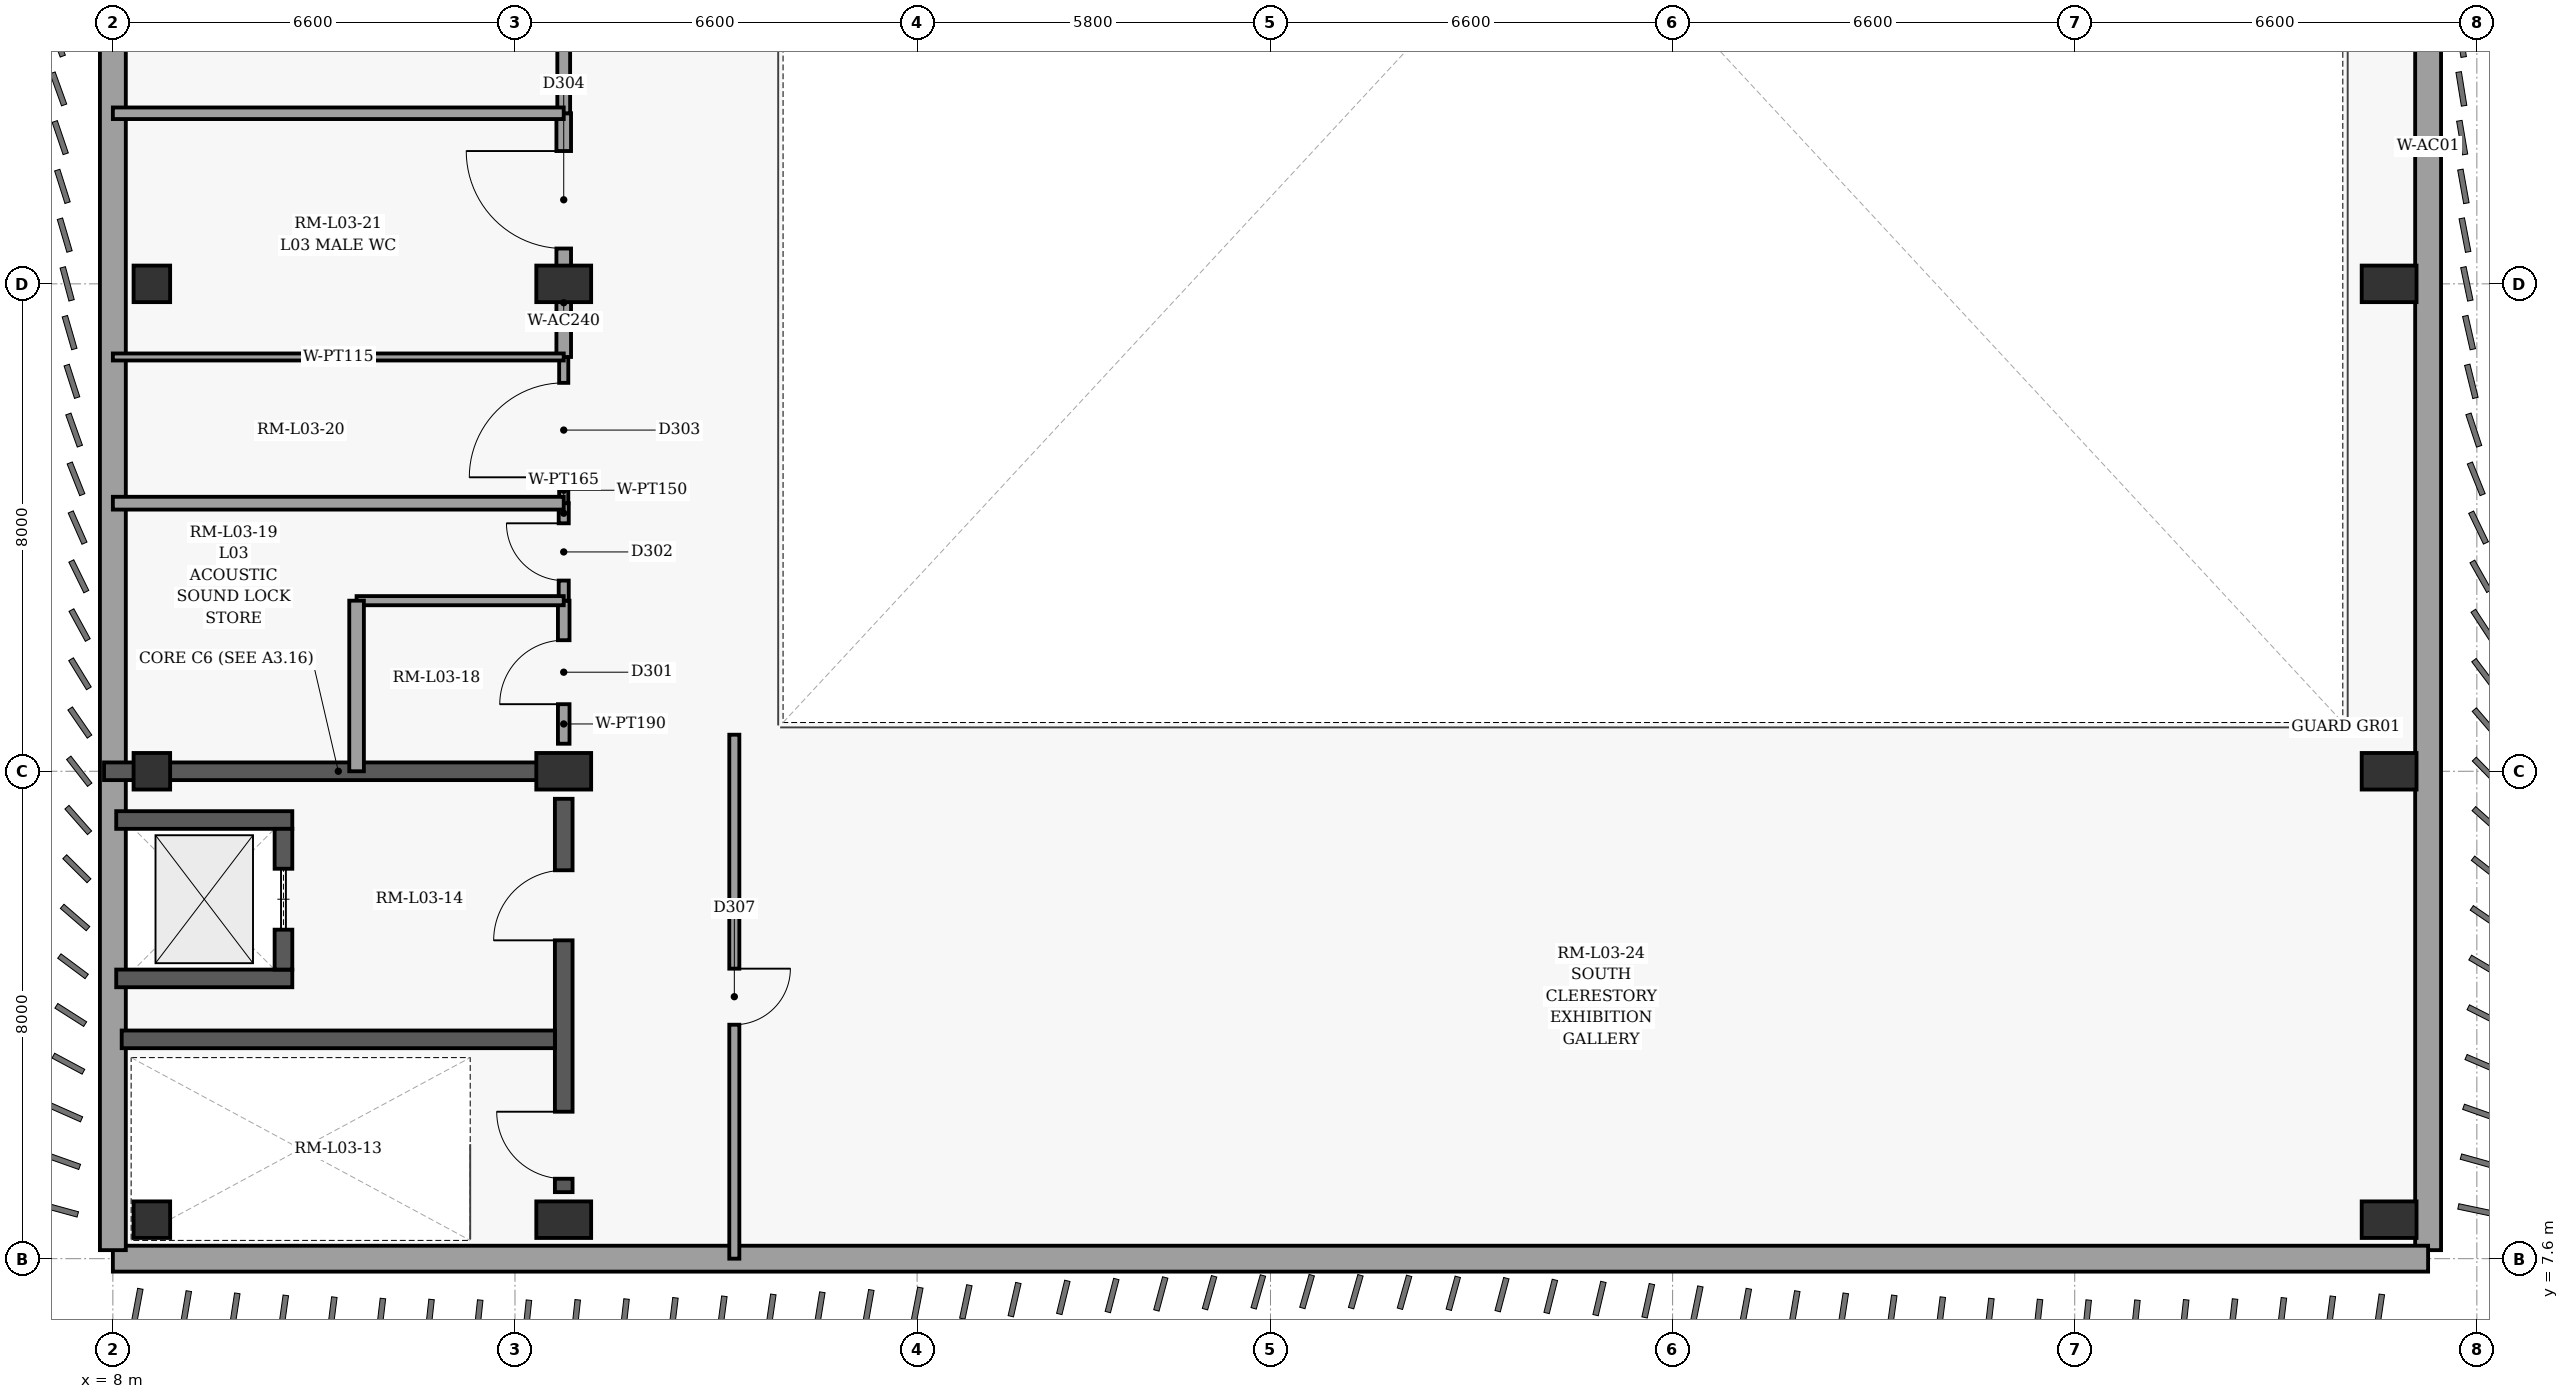
"""IFC4 building model, lengths in metres.
Left out: names, types, materials, properties, quantities, classifications, styles, units other than length and angle.
Written with IfcOpenShell. Run it as: python <this file> out.ifc"""

import sys

from ifc_helpers import new_model, si_unit, direction, frame, frame_2d, origin, origin_2d, place, context, subcontext, project, spatial, rectangle, extrude, element, fill, save


model = new_model("IFC4")
c1 = context("Model", 3, precision=1e-05, world=origin(), true_north=direction((0.0, 1.0)))
c2 = subcontext(c1, "Body", "Model", "MODEL_VIEW")
j1 = project(units=[si_unit("LENGTHUNIT", "METRE"), si_unit("PLANEANGLEUNIT", "RADIAN")], contexts=[c1])
p1 = place(None, origin())
s1 = spatial("IfcSite", under=j1, at=p1, CompositionType="ELEMENT")
p2 = place(p1, origin())
s2 = spatial("IfcBuilding", under=s1, at=p2, CompositionType="ELEMENT")
p3 = place(p2, frame((0.0, 0.0, 15.6)))
s3 = spatial("IfcBuildingStorey", under=s2, at=p3, CompositionType="ELEMENT", Elevation=15.6)
for number, where, z_axis, x_axis in (
    (1, (8.64, 8.24, 0.0), (0.0, 0.0, 1.0), (1.0, 0.0, 0.0)),
    (2, (8.64, 15.6, 0.0), (0.0, 0.0, 1.0), (1.0, 0.0, 0.0)),
    (3, (8.64, 23.6, 0.0), (0.0, 0.0, 1.0), (1.0, 0.0, 0.0)),
):
    element("IfcColumn", number, at=place(p3, frame(where, z_axis=z_axis, x_axis=x_axis)), inside=s3, PredefinedType="COLUMN", context=c2, shape_type="SweptSolid", body=[
        extrude(rectangle(XDim=0.6, YDim=0.6, at=origin_2d()), origin(), (0.0, 0.0, 1.0), 4.8),
    ])
for number, where, z_axis, x_axis in (
    (4, (15.4, 8.24, 0.0), (0.0, 0.0, 1.0), (1.0, 0.0, 0.0)),
    (5, (15.4, 15.6, 0.0), (0.0, 0.0, 1.0), (1.0, 0.0, 0.0)),
    (6, (15.4, 23.6, 0.0), (0.0, 0.0, 1.0), (1.0, 0.0, 0.0)),
    (7, (45.36, 8.24, 0.0), (0.0, 0.0, 1.0), (1.0, 0.0, 0.0)),
    (8, (45.36, 15.6, 0.0), (0.0, 0.0, 1.0), (1.0, 0.0, 0.0)),
    (9, (45.36, 23.6, 0.0), (0.0, 0.0, 1.0), (1.0, 0.0, 0.0)),
):
    element("IfcColumn", number, at=place(p3, frame(where, z_axis=z_axis, x_axis=x_axis)), inside=s3, PredefinedType="COLUMN", context=c2, shape_type="SweptSolid", body=[
        extrude(rectangle(XDim=0.6, YDim=0.9, at=origin_2d()), origin(), (0.0, 0.0, 1.0), 4.8),
    ])
p4 = place(p3, frame((46.0, 63.46, 0.0), z_axis=(0.0, 0.0, 1.0), x_axis=(0.0, -1.0, 0.0)))
e10 = element("IfcWall", 10, at=p4, inside=s3, PredefinedType="SOLIDWALL", context=c2, shape_type="SweptSolid", body=[
    extrude(rectangle(XDim=55.72, YDim=0.425, at=frame_2d((27.86, 0.0))), origin(), (0.0, 0.0, 1.0), 4.555),
])
p5 = place(p3, frame((46.0, 7.6, 0.0), z_axis=(0.0, 0.0, 1.0), x_axis=(-1.0, 0.0, 0.0)))
e11 = element("IfcWall", 11, at=p5, inside=s3, PredefinedType="SOLIDWALL", context=c2, shape_type="SweptSolid", body=[
    extrude(rectangle(XDim=38.0, YDim=0.425, at=frame_2d((19.0, 0.0))), origin(), (0.0, 0.0, 1.0), 4.162),
])
p6 = place(p3, frame((8.0, 7.74, 0.0), z_axis=(0.0, 0.0, 1.0), x_axis=(0.0, 1.0, 0.0)))
e12 = element("IfcWall", 12, at=p6, inside=s3, PredefinedType="SOLIDWALL", context=c2, shape_type="SweptSolid", body=[
    extrude(rectangle(XDim=55.72, YDim=0.425, at=frame_2d((27.86, 0.0))), origin(), (0.0, 0.0, 1.0), 4.555),
])
p7 = place(p3, frame((7.855, 15.6, 0.0), z_axis=(0.0, 0.0, 1.0), x_axis=(1.0, 0.0, 0.0)))
e13 = element("IfcWall", 13, at=p7, inside=s3, PredefinedType="SHEAR", context=c2, shape_type="SweptSolid", body=[
    extrude(rectangle(XDim=7.243, YDim=0.29, at=frame_2d((3.622, 0.0))), origin(), (0.0, 0.0, 1.0), 4.555),
])
p8 = place(p3, frame((15.4, 8.692, 0.0), z_axis=(0.0, 0.0, 1.0), x_axis=(0.0, 1.0, 0.0)))
e14 = element("IfcWall", 14, at=p8, inside=s3, PredefinedType="SHEAR", context=c2, shape_type="SweptSolid", body=[
    extrude(rectangle(XDim=6.456, YDim=0.29, at=frame_2d((3.228, 0.0))), origin(), (0.0, 0.0, 1.0), 4.555),
])
p9 = place(p8, frame((0.22, 0.0, 0.0)))
e15 = element("IfcOpeningElement", 15, at=p9, cuts=e14, PredefinedType="OPENING", context=c2, shape_type="SweptSolid", body=[
    extrude(rectangle(XDim=1.1, YDim=2.15, at=frame_2d((0.55, 1.075))), frame((0.0, 0.155, 0.0), z_axis=(0.0, -1.0, 0.0), x_axis=(1.0, 0.0, 0.0)), (0.0, 0.0, 1.0), 0.31),
])
p10 = place(p8, frame((4.133, 0.0, 0.0)))
e16 = element("IfcOpeningElement", 16, at=p10, cuts=e14, PredefinedType="OPENING", context=c2, shape_type="SweptSolid", body=[
    extrude(rectangle(XDim=1.15, YDim=2.2, at=frame_2d((0.575, 1.1))), frame((0.0, 0.155, 0.0), z_axis=(0.0, -1.0, 0.0), x_axis=(1.0, 0.0, 0.0)), (0.0, 0.0, 1.0), 0.31),
])
p11 = place(p3, frame((8.145, 11.2, 0.0), z_axis=(0.0, 0.0, 1.0), x_axis=(1.0, 0.0, 0.0)))
e17 = element("IfcWall", 17, at=p11, inside=s3, PredefinedType="SHEAR", context=c2, shape_type="SweptSolid", body=[
    extrude(rectangle(XDim=7.11, YDim=0.29, at=frame_2d((3.555, 0.0))), origin(), (0.0, 0.0, 1.0), 4.555),
])
for number, where, z_axis, x_axis in (
    (18, (8.055, 12.2, 0.0), (0.0, 0.0, 1.0), (1.0, 0.0, 0.0)),
    (19, (8.055, 14.8, 0.0), (0.0, 0.0, 1.0), (1.0, 0.0, 0.0)),
):
    element("IfcWall", number, at=place(p3, frame(where, z_axis=z_axis, x_axis=x_axis)), inside=s3, PredefinedType="SHEAR", context=c2, shape_type="SweptSolid", body=[
        extrude(rectangle(XDim=2.89, YDim=0.29, at=frame_2d((1.445, 0.0))), origin(), (0.0, 0.0, 1.0), 4.555),
    ])
p12 = place(p3, frame((10.8, 12.345, 0.0), z_axis=(0.0, 0.0, 1.0), x_axis=(0.0, 1.0, 0.0)))
e20 = element("IfcWall", 20, at=p12, inside=s3, PredefinedType="SHEAR", context=c2, shape_type="SweptSolid", body=[
    extrude(rectangle(XDim=2.31, YDim=0.29, at=frame_2d((1.155, 0.0))), origin(), (0.0, 0.0, 1.0), 4.555),
])
p13 = place(p12, frame((0.655, 0.0, 0.0)))
e21 = element("IfcOpeningElement", 21, at=p13, cuts=e20, PredefinedType="OPENING", context=c2, shape_type="SweptSolid", body=[
    extrude(rectangle(XDim=1.0, YDim=2.15, at=frame_2d((0.5, 1.075))), frame((0.0, 0.155, 0.0), z_axis=(0.0, -1.0, 0.0), x_axis=(1.0, 0.0, 0.0)), (0.0, 0.0, 1.0), 0.31),
])
p14 = place(p3, frame((15.4, 16.052, 0.0), z_axis=(0.0, 0.0, 1.0), x_axis=(0.0, 1.0, 0.0)))
e22 = element("IfcWall", 22, at=p14, inside=s3, PredefinedType="PARTITIONING", context=c2, shape_type="SweptSolid", body=[
    extrude(rectangle(XDim=2.348, YDim=0.19, at=frame_2d((1.174, 0.0))), origin(), (0.0, 0.0, 1.0), 2.732),
])
p15 = place(p14, frame((0.649, 0.0, 0.0)))
e23 = element("IfcOpeningElement", 23, at=p15, cuts=e22, PredefinedType="OPENING", context=c2, shape_type="SweptSolid", body=[
    extrude(rectangle(XDim=1.05, YDim=2.15, at=frame_2d((0.525, 1.075))), frame((0.0, 0.105, 0.0), z_axis=(0.0, -1.0, 0.0), x_axis=(1.0, 0.0, 0.0)), (0.0, 0.0, 1.0), 0.21),
])
p16 = place(p3, frame((15.4, 18.4, 0.0), z_axis=(0.0, 0.0, 1.0), x_axis=(0.0, 1.0, 0.0)))
e24 = element("IfcWall", 24, at=p16, inside=s3, PredefinedType="PARTITIONING", context=c2, shape_type="SweptSolid", body=[
    extrude(rectangle(XDim=1.6, YDim=0.165, at=frame_2d((0.8, 0.0))), origin(), (0.0, 0.0, 1.0), 2.732),
])
p17 = place(p16, frame((0.33, 0.0, 0.0)))
e25 = element("IfcOpeningElement", 25, at=p17, cuts=e24, PredefinedType="OPENING", context=c2, shape_type="SweptSolid", body=[
    extrude(rectangle(XDim=0.94, YDim=2.15, at=frame_2d((0.47, 1.075))), frame((0.0, 0.093, 0.0), z_axis=(0.0, -1.0, 0.0), x_axis=(1.0, 0.0, 0.0)), (0.0, 0.0, 1.0), 0.185),
])
p18 = place(p3, frame((15.4, 20.0, 0.0), z_axis=(0.0, 0.0, 1.0), x_axis=(0.0, 1.0, 0.0)))
e26 = element("IfcWall", 26, at=p18, inside=s3, PredefinedType="PARTITIONING", context=c2, shape_type="SweptSolid", body=[
    extrude(rectangle(XDim=2.4, YDim=0.15, at=frame_2d((1.2, 0.0))), origin(), (0.0, 0.0, 1.0), 2.732),
])
p19 = place(p18, frame((0.425, 0.0, 0.0)))
e27 = element("IfcOpeningElement", 27, at=p19, cuts=e26, PredefinedType="OPENING", context=c2, shape_type="SweptSolid", body=[
    extrude(rectangle(XDim=1.55, YDim=2.25, at=frame_2d((0.775, 1.125))), frame((0.0, 0.085, 0.0), z_axis=(0.0, -1.0, 0.0), x_axis=(1.0, 0.0, 0.0)), (0.0, 0.0, 1.0), 0.17),
])
p20 = place(p3, frame((15.4, 22.4, 0.0), z_axis=(0.0, 0.0, 1.0), x_axis=(0.0, 1.0, 0.0)))
e28 = element("IfcWall", 28, at=p20, inside=s3, PredefinedType="PARTITIONING", context=c2, shape_type="SweptSolid", body=[
    extrude(rectangle(XDim=4.0, YDim=0.24, at=frame_2d((2.0, 0.0))), origin(), (0.0, 0.0, 1.0), 2.732),
])
p21 = place(p20, frame((1.78, 0.0, 0.0)))
e29 = element("IfcOpeningElement", 29, at=p21, cuts=e28, PredefinedType="OPENING", context=c2, shape_type="SweptSolid", body=[
    extrude(rectangle(XDim=1.6, YDim=2.3, at=frame_2d((0.8, 1.15))), frame((0.0, 0.13, 0.0), z_axis=(0.0, -1.0, 0.0), x_axis=(1.0, 0.0, 0.0)), (0.0, 0.0, 1.0), 0.26),
])
p22 = place(p3, frame((15.4, 26.4, 0.0), z_axis=(0.0, 0.0, 1.0), x_axis=(0.0, 1.0, 0.0)))
e30 = element("IfcWall", 30, at=p22, inside=s3, PredefinedType="PARTITIONING", context=c2, shape_type="SweptSolid", body=[
    extrude(rectangle(XDim=19.6, YDim=0.21, at=frame_2d((9.8, 0.0))), origin(), (0.0, 0.0, 1.0), 2.732),
])
p23 = place(p22, frame((9.28, 0.0, 0.0)))
e31 = element("IfcOpeningElement", 31, at=p23, cuts=e30, PredefinedType="OPENING", context=c2, shape_type="SweptSolid", body=[
    extrude(rectangle(XDim=1.04, YDim=2.2, at=frame_2d((0.52, 1.1))), frame((0.0, 0.115, 0.0), z_axis=(0.0, -1.0, 0.0), x_axis=(1.0, 0.0, 0.0)), (0.0, 0.0, 1.0), 0.23),
])
p24 = place(p3, frame((18.2, 16.2, 0.0), z_axis=(0.0, 0.0, 1.0), x_axis=(0.0, -1.0, 0.0)))
e32 = element("IfcWall", 32, at=p24, inside=s3, PredefinedType="PARTITIONING", context=c2, shape_type="SweptSolid", body=[
    extrude(rectangle(XDim=8.6, YDim=0.165, at=frame_2d((4.3, 0.0))), origin(), (0.0, 0.0, 1.0), 4.555),
])
p25 = place(p24, frame((3.84, 0.0, 0.0)))
e33 = element("IfcOpeningElement", 33, at=p25, cuts=e32, PredefinedType="OPENING", context=c2, shape_type="SweptSolid", body=[
    extrude(rectangle(XDim=0.92, YDim=2.1, at=frame_2d((0.46, 1.05))), frame((0.0, 0.093, 0.0), z_axis=(0.0, -1.0, 0.0), x_axis=(1.0, 0.0, 0.0)), (0.0, 0.0, 1.0), 0.185),
])
p26 = place(p3, frame((12.0, 18.4, 0.0), z_axis=(0.0, 0.0, 1.0), x_axis=(1.0, 0.0, 0.0)))
e34 = element("IfcWall", 34, at=p26, inside=s3, PredefinedType="PARTITIONING", context=c2, shape_type="SweptSolid", body=[
    extrude(rectangle(XDim=3.4, YDim=0.15, at=frame_2d((1.7, 0.0))), origin(), (0.0, 0.0, 1.0), 4.555),
])
p27 = place(p3, frame((12.0, 15.6, 0.0), z_axis=(0.0, 0.0, 1.0), x_axis=(0.0, 1.0, 0.0)))
e35 = element("IfcWall", 35, at=p27, inside=s3, PredefinedType="PARTITIONING", context=c2, shape_type="SweptSolid", body=[
    extrude(rectangle(XDim=2.8, YDim=0.24, at=frame_2d((1.4, 0.0))), origin(), (0.0, 0.0, 1.0), 4.555),
])
p28 = place(p3, frame((8.0, 20.0, 0.0), z_axis=(0.0, 0.0, 1.0), x_axis=(1.0, 0.0, 0.0)))
e36 = element("IfcWall", 36, at=p28, inside=s3, PredefinedType="PARTITIONING", context=c2, shape_type="SweptSolid", body=[
    extrude(rectangle(XDim=7.4, YDim=0.21, at=frame_2d((3.7, 0.0))), origin(), (0.0, 0.0, 1.0), 4.555),
])
p29 = place(p3, frame((8.0, 22.4, 0.0), z_axis=(0.0, 0.0, 1.0), x_axis=(1.0, 0.0, 0.0)))
e37 = element("IfcWall", 37, at=p29, inside=s3, PredefinedType="PARTITIONING", context=c2, shape_type="SweptSolid", body=[
    extrude(rectangle(XDim=7.4, YDim=0.115, at=frame_2d((3.7, 0.0))), origin(), (0.0, 0.0, 1.0), 4.555),
])
p30 = place(p3, frame((8.0, 26.4, 0.0), z_axis=(0.0, 0.0, 1.0), x_axis=(1.0, 0.0, 0.0)))
e38 = element("IfcWall", 38, at=p30, inside=s3, PredefinedType="PARTITIONING", context=c2, shape_type="SweptSolid", body=[
    extrude(rectangle(XDim=7.4, YDim=0.19, at=frame_2d((3.7, 0.0))), origin(), (0.0, 0.0, 1.0), 4.555),
])
p31 = place(p9, origin())
e39 = element("IfcDoor", 39, at=p31, inside=s3, OperationType="SINGLE_SWING_RIGHT", PredefinedType="DOOR", context=c2, shape_type="SweptSolid", body=[
    extrude(rectangle(XDim=1.1, YDim=2.15, at=frame_2d((0.55, 1.075))), frame((0.0, 0.025, 0.0), z_axis=(0.0, -1.0, 0.0), x_axis=(1.0, 0.0, 0.0)), (0.0, 0.0, 1.0), 0.05),
])
fill(e15, e39)
p32 = place(p10, origin())
e40 = element("IfcDoor", 40, at=p32, inside=s3, OperationType="SINGLE_SWING_LEFT", PredefinedType="DOOR", context=c2, shape_type="SweptSolid", body=[
    extrude(rectangle(XDim=1.15, YDim=2.2, at=frame_2d((0.575, 1.1))), frame((0.0, 0.025, 0.0), z_axis=(0.0, -1.0, 0.0), x_axis=(1.0, 0.0, 0.0)), (0.0, 0.0, 1.0), 0.05),
])
fill(e16, e40)
p33 = place(p13, origin())
e41 = element("IfcDoor", 41, at=p33, inside=s3, OperationType="SLIDING_TO_LEFT", PredefinedType="DOOR", context=c2, shape_type="SweptSolid", body=[
    extrude(rectangle(XDim=1.0, YDim=2.15, at=frame_2d((0.5, 1.075))), frame((0.0, 0.025, 0.0), z_axis=(0.0, -1.0, 0.0), x_axis=(1.0, 0.0, 0.0)), (0.0, 0.0, 1.0), 0.05),
])
fill(e21, e41)
p34 = place(p15, origin())
e42 = element("IfcDoor", 42, at=p34, inside=s3, OperationType="SINGLE_SWING_LEFT", PredefinedType="DOOR", context=c2, shape_type="SweptSolid", body=[
    extrude(rectangle(XDim=1.05, YDim=2.15, at=frame_2d((0.525, 1.075))), frame((0.0, 0.025, 0.0), z_axis=(0.0, -1.0, 0.0), x_axis=(1.0, 0.0, 0.0)), (0.0, 0.0, 1.0), 0.05),
])
fill(e23, e42)
p35 = place(p17, origin())
e43 = element("IfcDoor", 43, at=p35, inside=s3, OperationType="SINGLE_SWING_RIGHT", PredefinedType="DOOR", context=c2, shape_type="SweptSolid", body=[
    extrude(rectangle(XDim=0.94, YDim=2.15, at=frame_2d((0.47, 1.075))), frame((0.0, 0.025, 0.0), z_axis=(0.0, -1.0, 0.0), x_axis=(1.0, 0.0, 0.0)), (0.0, 0.0, 1.0), 0.05),
])
fill(e25, e43)
p36 = place(p19, origin())
e44 = element("IfcDoor", 44, at=p36, inside=s3, OperationType="SINGLE_SWING_LEFT", PredefinedType="DOOR", context=c2, shape_type="SweptSolid", body=[
    extrude(rectangle(XDim=1.55, YDim=2.25, at=frame_2d((0.775, 1.125))), frame((0.0, 0.025, 0.0), z_axis=(0.0, -1.0, 0.0), x_axis=(1.0, 0.0, 0.0)), (0.0, 0.0, 1.0), 0.05),
])
fill(e27, e44)
p37 = place(p21, origin())
e45 = element("IfcDoor", 45, at=p37, inside=s3, OperationType="SINGLE_SWING_RIGHT", PredefinedType="DOOR", context=c2, shape_type="SweptSolid", body=[
    extrude(rectangle(XDim=1.6, YDim=2.3, at=frame_2d((0.8, 1.15))), frame((0.0, 0.025, 0.0), z_axis=(0.0, -1.0, 0.0), x_axis=(1.0, 0.0, 0.0)), (0.0, 0.0, 1.0), 0.05),
])
fill(e29, e45)
p38 = place(p25, origin())
e46 = element("IfcDoor", 46, at=p38, inside=s3, OperationType="SINGLE_SWING_LEFT", PredefinedType="DOOR", context=c2, shape_type="SweptSolid", body=[
    extrude(rectangle(XDim=0.92, YDim=2.1, at=frame_2d((0.46, 1.05))), frame((0.0, 0.025, 0.0), z_axis=(0.0, -1.0, 0.0), x_axis=(1.0, 0.0, 0.0)), (0.0, 0.0, 1.0), 0.05),
])
fill(e33, e46)
save(model, sys.argv[1])
